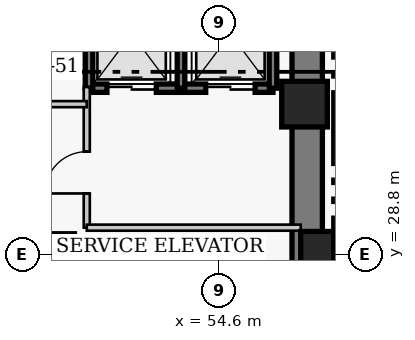
"""IFC4 building model, lengths in metres.
Left out: names, types, materials, properties, quantities, classifications, styles, units other than length and angle.
Written with IfcOpenShell. Run it as: python <this file> out.ifc"""

import sys

from ifc_helpers import new_model, si_unit, direction, frame, frame_2d, origin, origin_2d, place, context, subcontext, project, spatial, rectangle, extrude, element, fill, save


model = new_model("IFC4")
c1 = context("Model", 3, precision=1e-05, world=origin(), true_north=direction((0.0, 1.0)))
c2 = subcontext(c1, "Body", "Model", "MODEL_VIEW")
j1 = project(units=[si_unit("LENGTHUNIT", "METRE"), si_unit("PLANEANGLEUNIT", "RADIAN")], contexts=[c1])
p1 = place(None, origin())
s1 = spatial("IfcSite", under=j1, at=p1, CompositionType="ELEMENT")
p2 = place(p1, origin())
s2 = spatial("IfcBuilding", under=s1, at=p2, CompositionType="ELEMENT")
p3 = place(p2, frame((0.0, 0.0, 126.0)))
s3 = spatial("IfcBuildingStorey", under=s2, at=p3, CompositionType="ELEMENT", Elevation=126.0)
p4 = place(p3, frame((56.92, 27.05, 0.0), z_axis=(0.0, 0.0, 1.0), x_axis=(0.0, 1.0, 0.0)))
e1 = element("IfcWall", 1, at=p4, inside=s3, PredefinedType="SHEAR", context=c2, shape_type="SweptSolid", body=[
    extrude(rectangle(XDim=13.67, YDim=0.8, at=frame_2d((6.835, 0.0))), origin(), (0.0, 0.0, 1.0), 3.8),
])
for number, where, z_axis, x_axis in (
    (2, (57.35, 28.8, 0.0), (0.0, 0.0, 1.0), (1.0, 0.0, 0.0)),
    (3, (56.85, 32.75, 0.0), (0.0, 0.0, 1.0), (1.0, 0.0, 0.0)),
):
    element("IfcColumn", number, at=place(p3, frame(where, z_axis=z_axis, x_axis=x_axis)), inside=s3, PredefinedType="COLUMN", context=c2, shape_type="SweptSolid", body=[
        extrude(rectangle(XDim=1.2, YDim=1.2, at=origin_2d()), origin(), (0.0, 0.0, 1.0), 3.8),
    ])
p5 = place(p3, frame((48.55, 29.23, 0.0), z_axis=(0.0, 0.0, 1.0), x_axis=(1.0, 0.0, 0.0)))
e4 = element("IfcWall", 4, at=p5, inside=s3, PredefinedType="SHEAR", context=c2, shape_type="SweptSolid", body=[
    extrude(rectangle(XDim=2.245, YDim=0.22, at=frame_2d((1.123, 0.0))), origin(), (0.0, 0.0, 1.0), 3.8),
])
p6 = place(p3, frame((50.795, 27.17, 0.0), z_axis=(0.0, 0.0, 1.0), x_axis=(0.0, 1.0, 0.0)))
e5 = element("IfcWall", 5, at=p6, inside=s3, PredefinedType="SHEAR", context=c2, shape_type="SweptSolid", body=[
    extrude(rectangle(XDim=2.06, YDim=0.2, at=frame_2d((1.03, 0.0))), origin(), (0.0, 0.0, 1.0), 3.8),
])
p7 = place(p3, frame((51.18, 33.17, 0.0), z_axis=(0.0, 0.0, 1.0), x_axis=(1.0, 0.0, 0.0)))
e6 = element("IfcWall", 6, at=p7, inside=s3, PredefinedType="SHEAR", context=c2, shape_type="SweptSolid", body=[
    extrude(rectangle(XDim=2.42, YDim=0.22, at=frame_2d((1.21, 0.0))), origin(), (0.0, 0.0, 1.0), 3.8),
])
p8 = place(p7, frame((0.47, 0.0, 0.0)))
e7 = element("IfcOpeningElement", 7, at=p8, cuts=e6, PredefinedType="OPENING", context=c2, shape_type="SweptSolid", body=[
    extrude(rectangle(XDim=1.3, YDim=2.15, at=frame_2d((0.65, 1.075))), frame((0.0, 0.12, 0.0), z_axis=(0.0, -1.0, 0.0), x_axis=(1.0, 0.0, 0.0)), (0.0, 0.0, 1.0), 0.24),
])
p9 = place(p3, frame((51.18, 33.17, 0.0), z_axis=(0.0, 0.0, 1.0), x_axis=(0.0, 1.0, 0.0)))
e8 = element("IfcWall", 8, at=p9, inside=s3, PredefinedType="SHEAR", context=c2, shape_type="SweptSolid", body=[
    extrude(rectangle(XDim=2.86, YDim=0.2, at=frame_2d((1.43, 0.0))), origin(), (0.0, 0.0, 1.0), 3.8),
])
p10 = place(p3, frame((53.6, 33.17, 0.0), z_axis=(0.0, 0.0, 1.0), x_axis=(1.0, 0.0, 0.0)))
e9 = element("IfcWall", 9, at=p10, inside=s3, PredefinedType="SHEAR", context=c2, shape_type="SweptSolid", body=[
    extrude(rectangle(XDim=2.42, YDim=0.22, at=frame_2d((1.21, 0.0))), origin(), (0.0, 0.0, 1.0), 3.8),
])
p11 = place(p10, frame((0.65, 0.0, 0.0)))
e10 = element("IfcOpeningElement", 10, at=p11, cuts=e9, PredefinedType="OPENING", context=c2, shape_type="SweptSolid", body=[
    extrude(rectangle(XDim=1.3, YDim=2.15, at=frame_2d((0.65, 1.075))), frame((0.0, 0.12, 0.0), z_axis=(0.0, -1.0, 0.0), x_axis=(1.0, 0.0, 0.0)), (0.0, 0.0, 1.0), 0.24),
])
for number, where, z_axis, x_axis in (
    (11, (53.6, 33.17, 0.0), (0.0, 0.0, 1.0), (0.0, 1.0, 0.0)),
    (12, (56.02, 33.17, 0.0), (0.0, 0.0, 1.0), (0.0, 1.0, 0.0)),
):
    element("IfcWall", number, at=place(p3, frame(where, z_axis=z_axis, x_axis=x_axis)), inside=s3, PredefinedType="SHEAR", context=c2, shape_type="SweptSolid", body=[
        extrude(rectangle(XDim=2.86, YDim=0.2, at=frame_2d((1.43, 0.0))), origin(), (0.0, 0.0, 1.0), 3.8),
    ])
p12 = place(p3, frame((51.12, 29.5, 0.0), z_axis=(0.0, 0.0, 1.0), x_axis=(0.0, 1.0, 0.0)))
e13 = element("IfcWall", 13, at=p12, inside=s3, PredefinedType="PARTITIONING", context=c2, shape_type="SweptSolid", body=[
    extrude(rectangle(XDim=3.7, YDim=0.16, at=frame_2d((1.85, 0.0))), origin(), (0.0, 0.0, 1.0), 3.46),
])
p13 = place(p12, frame((0.9, 0.0, 0.0)))
e14 = element("IfcOpeningElement", 14, at=p13, cuts=e13, PredefinedType="OPENING", context=c2, shape_type="SweptSolid", body=[
    extrude(rectangle(XDim=1.1, YDim=2.15, at=frame_2d((0.55, 1.075))), frame((0.0, 0.09, 0.0), z_axis=(0.0, -1.0, 0.0), x_axis=(1.0, 0.0, 0.0)), (0.0, 0.0, 1.0), 0.18),
])
p14 = place(p3, frame((51.12, 29.5, 0.0), z_axis=(0.0, 0.0, 1.0), x_axis=(1.0, 0.0, 0.0)))
e15 = element("IfcWall", 15, at=p14, inside=s3, PredefinedType="PARTITIONING", context=c2, shape_type="SweptSolid", body=[
    extrude(rectangle(XDim=5.63, YDim=0.16, at=frame_2d((2.815, 0.0))), origin(), (0.0, 0.0, 1.0), 3.46),
])
p15 = place(p3, frame((48.92, 32.75, 0.0), z_axis=(0.0, 0.0, 1.0), x_axis=(1.0, 0.0, 0.0)))
e16 = element("IfcWall", 16, at=p15, inside=s3, PredefinedType="PARTITIONING", context=c2, shape_type="SweptSolid", body=[
    extrude(rectangle(XDim=2.2, YDim=0.16, at=frame_2d((1.1, 0.0))), origin(), (0.0, 0.0, 1.0), 3.46),
])
p16 = place(p8, origin())
e17 = element("IfcDoor", 17, at=p16, inside=s3, OperationType="DOUBLE_DOOR_SLIDING", PredefinedType="DOOR", context=c2, shape_type="SweptSolid", body=[
    extrude(rectangle(XDim=1.3, YDim=2.15, at=frame_2d((0.65, 1.075))), frame((0.0, 0.025, 0.0), z_axis=(0.0, -1.0, 0.0), x_axis=(1.0, 0.0, 0.0)), (0.0, 0.0, 1.0), 0.05),
])
fill(e7, e17)
p17 = place(p11, origin())
e18 = element("IfcDoor", 18, at=p17, inside=s3, OperationType="DOUBLE_DOOR_SLIDING", PredefinedType="DOOR", context=c2, shape_type="SweptSolid", body=[
    extrude(rectangle(XDim=1.3, YDim=2.15, at=frame_2d((0.65, 1.075))), frame((0.0, 0.025, 0.0), z_axis=(0.0, -1.0, 0.0), x_axis=(1.0, 0.0, 0.0)), (0.0, 0.0, 1.0), 0.05),
])
fill(e10, e18)
p18 = place(p13, origin())
e19 = element("IfcDoor", 19, at=p18, inside=s3, OperationType="SINGLE_SWING_LEFT", PredefinedType="DOOR", context=c2, shape_type="SweptSolid", body=[
    extrude(rectangle(XDim=1.1, YDim=2.15, at=frame_2d((0.55, 1.075))), frame((0.0, 0.025, 0.0), z_axis=(0.0, -1.0, 0.0), x_axis=(1.0, 0.0, 0.0)), (0.0, 0.0, 1.0), 0.05),
])
fill(e14, e19)
save(model, sys.argv[1])
